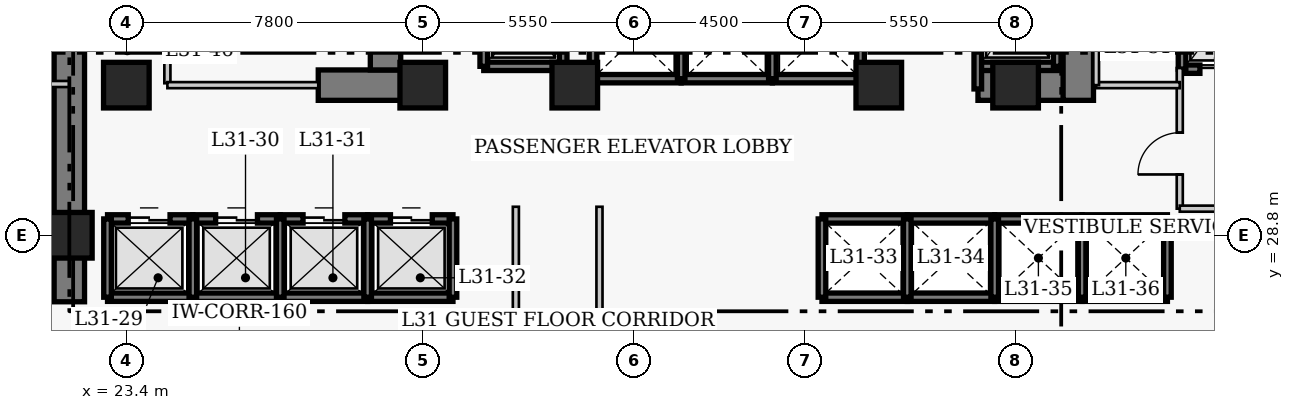
"""IFC4 building model, lengths in metres.
Left out: names, types, materials, properties, quantities, classifications, styles, units other than length and angle.
Written with IfcOpenShell. Run it as: python <this file> out.ifc"""

import sys

from ifc_helpers import new_model, si_unit, direction, frame, frame_2d, origin, origin_2d, place, context, subcontext, project, spatial, rectangle, extrude, element, fill, save


model = new_model("IFC4")
c1 = context("Model", 3, precision=1e-05, world=origin(), true_north=direction((0.0, 1.0)))
c2 = subcontext(c1, "Body", "Model", "MODEL_VIEW")
j1 = project(units=[si_unit("LENGTHUNIT", "METRE"), si_unit("PLANEANGLEUNIT", "RADIAN")], contexts=[c1])
p1 = place(None, origin())
s1 = spatial("IfcSite", under=j1, at=p1, CompositionType="ELEMENT")
p2 = place(p1, origin())
s2 = spatial("IfcBuilding", under=s1, at=p2, CompositionType="ELEMENT")
p3 = place(p2, frame((0.0, 0.0, 126.0)))
s3 = spatial("IfcBuildingStorey", under=s2, at=p3, CompositionType="ELEMENT", Elevation=126.0)
p4 = place(p3, frame((21.9, 27.05, 0.0), z_axis=(0.0, 0.0, 1.0), x_axis=(0.0, 1.0, 0.0)))
e1 = element("IfcWall", 1, at=p4, inside=s3, PredefinedType="SHEAR", context=c2, shape_type="SweptSolid", body=[
    extrude(rectangle(XDim=13.67, YDim=0.8, at=frame_2d((6.835, 0.0))), origin(), (0.0, 0.0, 1.0), 3.8),
])
p5 = place(p3, frame((28.45, 32.75, 0.0), z_axis=(0.0, 0.0, 1.0), x_axis=(1.0, 0.0, 0.0)))
e2 = element("IfcWall", 2, at=p5, inside=s3, PredefinedType="SHEAR", context=c2, shape_type="SweptSolid", body=[
    extrude(rectangle(XDim=2.4, YDim=0.8, at=frame_2d((1.2, 0.0))), origin(), (0.0, 0.0, 1.0), 3.8),
])
p6 = place(p3, frame((45.81, 32.75, 0.0), z_axis=(0.0, 0.0, 1.0), x_axis=(1.0, 0.0, 0.0)))
e3 = element("IfcWall", 3, at=p6, inside=s3, PredefinedType="SHEAR", context=c2, shape_type="SweptSolid", body=[
    extrude(rectangle(XDim=2.64, YDim=0.8, at=frame_2d((1.32, 0.0))), origin(), (0.0, 0.0, 1.0), 3.8),
])
p7 = place(p3, frame((30.22, 33.15, 0.0), z_axis=(0.0, 0.0, 1.0), x_axis=(0.0, 1.0, 0.0)))
e4 = element("IfcWall", 4, at=p7, inside=s3, PredefinedType="SHEAR", context=c2, shape_type="SweptSolid", body=[
    extrude(rectangle(XDim=7.17, YDim=0.8, at=frame_2d((3.585, 0.0))), origin(), (0.0, 0.0, 1.0), 3.8),
])
p8 = place(p3, frame((48.45, 32.35, 0.0), z_axis=(0.0, 0.0, 1.0), x_axis=(0.0, 1.0, 0.0)))
e5 = element("IfcWall", 5, at=p8, inside=s3, PredefinedType="SHEAR", context=c2, shape_type="SweptSolid", body=[
    extrude(rectangle(XDim=7.97, YDim=0.8, at=frame_2d((3.985, 0.0))), origin(), (0.0, 0.0, 1.0), 3.8),
])
p9 = place(p8, frame((5.85, 0.0, 0.0)))
e6 = element("IfcOpeningElement", 6, at=p9, cuts=e5, PredefinedType="OPENING", context=c2, shape_type="SweptSolid", body=[
    extrude(rectangle(XDim=1.1, YDim=2.15, at=frame_2d((0.55, 1.075))), frame((0.0, 0.41, 0.0), z_axis=(0.0, -1.0, 0.0), x_axis=(1.0, 0.0, 0.0)), (0.0, 0.0, 1.0), 0.82),
])
for number, where, z_axis, x_axis in (
    (7, (21.9, 28.8, 0.0), (0.0, 0.0, 1.0), (1.0, 0.0, 0.0)),
    (8, (23.4, 32.75, 0.0), (0.0, 0.0, 1.0), (1.0, 0.0, 0.0)),
    (9, (31.2, 32.75, 0.0), (0.0, 0.0, 1.0), (1.0, 0.0, 0.0)),
    (10, (35.2, 32.75, 0.0), (0.0, 0.0, 1.0), (1.0, 0.0, 0.0)),
    (11, (43.2, 32.75, 0.0), (0.0, 0.0, 1.0), (1.0, 0.0, 0.0)),
    (12, (46.8, 32.75, 0.0), (0.0, 0.0, 1.0), (1.0, 0.0, 0.0)),
):
    element("IfcColumn", number, at=place(p3, frame(where, z_axis=z_axis, x_axis=x_axis)), inside=s3, PredefinedType="COLUMN", context=c2, shape_type="SweptSolid", body=[
        extrude(rectangle(XDim=1.2, YDim=1.2, at=origin_2d()), origin(), (0.0, 0.0, 1.0), 3.8),
    ])
p10 = place(p3, frame((22.905, 29.23, 0.0), z_axis=(0.0, 0.0, 1.0), x_axis=(1.0, 0.0, 0.0)))
e13 = element("IfcWall", 13, at=p10, inside=s3, PredefinedType="SHEAR", context=c2, shape_type="SweptSolid", body=[
    extrude(rectangle(XDim=2.245, YDim=0.22, at=frame_2d((1.123, 0.0))), origin(), (0.0, 0.0, 1.0), 3.8),
])
p11 = place(p10, frame((0.545, 0.0, 0.0)))
e14 = element("IfcOpeningElement", 14, at=p11, cuts=e13, PredefinedType="OPENING", context=c2, shape_type="SweptSolid", body=[
    extrude(rectangle(XDim=1.1, YDim=2.15, at=frame_2d((0.55, 1.075))), frame((0.0, 0.12, 0.0), z_axis=(0.0, -1.0, 0.0), x_axis=(1.0, 0.0, 0.0)), (0.0, 0.0, 1.0), 0.24),
])
p12 = place(p3, frame((22.905, 27.17, 0.0), z_axis=(0.0, 0.0, 1.0), x_axis=(1.0, 0.0, 0.0)))
e15 = element("IfcWall", 15, at=p12, inside=s3, PredefinedType="SHEAR", context=c2, shape_type="SweptSolid", body=[
    extrude(rectangle(XDim=2.245, YDim=0.22, at=frame_2d((1.123, 0.0))), origin(), (0.0, 0.0, 1.0), 3.8),
])
p13 = place(p3, frame((22.905, 27.17, 0.0), z_axis=(0.0, 0.0, 1.0), x_axis=(0.0, 1.0, 0.0)))
e16 = element("IfcWall", 16, at=p13, inside=s3, PredefinedType="SHEAR", context=c2, shape_type="SweptSolid", body=[
    extrude(rectangle(XDim=2.06, YDim=0.2, at=frame_2d((1.03, 0.0))), origin(), (0.0, 0.0, 1.0), 3.8),
])
p14 = place(p3, frame((25.15, 29.23, 0.0), z_axis=(0.0, 0.0, 1.0), x_axis=(1.0, 0.0, 0.0)))
e17 = element("IfcWall", 17, at=p14, inside=s3, PredefinedType="SHEAR", context=c2, shape_type="SweptSolid", body=[
    extrude(rectangle(XDim=2.3, YDim=0.22, at=frame_2d((1.15, 0.0))), origin(), (0.0, 0.0, 1.0), 3.8),
])
p15 = place(p14, frame((0.6, 0.0, 0.0)))
e18 = element("IfcOpeningElement", 18, at=p15, cuts=e17, PredefinedType="OPENING", context=c2, shape_type="SweptSolid", body=[
    extrude(rectangle(XDim=1.1, YDim=2.15, at=frame_2d((0.55, 1.075))), frame((0.0, 0.12, 0.0), z_axis=(0.0, -1.0, 0.0), x_axis=(1.0, 0.0, 0.0)), (0.0, 0.0, 1.0), 0.24),
])
p16 = place(p3, frame((25.15, 27.17, 0.0), z_axis=(0.0, 0.0, 1.0), x_axis=(1.0, 0.0, 0.0)))
e19 = element("IfcWall", 19, at=p16, inside=s3, PredefinedType="SHEAR", context=c2, shape_type="SweptSolid", body=[
    extrude(rectangle(XDim=2.3, YDim=0.22, at=frame_2d((1.15, 0.0))), origin(), (0.0, 0.0, 1.0), 3.8),
])
p17 = place(p3, frame((25.15, 27.17, 0.0), z_axis=(0.0, 0.0, 1.0), x_axis=(0.0, 1.0, 0.0)))
e20 = element("IfcWall", 20, at=p17, inside=s3, PredefinedType="SHEAR", context=c2, shape_type="SweptSolid", body=[
    extrude(rectangle(XDim=2.06, YDim=0.2, at=frame_2d((1.03, 0.0))), origin(), (0.0, 0.0, 1.0), 3.8),
])
p18 = place(p3, frame((27.45, 29.23, 0.0), z_axis=(0.0, 0.0, 1.0), x_axis=(1.0, 0.0, 0.0)))
e21 = element("IfcWall", 21, at=p18, inside=s3, PredefinedType="SHEAR", context=c2, shape_type="SweptSolid", body=[
    extrude(rectangle(XDim=2.3, YDim=0.22, at=frame_2d((1.15, 0.0))), origin(), (0.0, 0.0, 1.0), 3.8),
])
p19 = place(p18, frame((0.6, 0.0, 0.0)))
e22 = element("IfcOpeningElement", 22, at=p19, cuts=e21, PredefinedType="OPENING", context=c2, shape_type="SweptSolid", body=[
    extrude(rectangle(XDim=1.1, YDim=2.15, at=frame_2d((0.55, 1.075))), frame((0.0, 0.12, 0.0), z_axis=(0.0, -1.0, 0.0), x_axis=(1.0, 0.0, 0.0)), (0.0, 0.0, 1.0), 0.24),
])
p20 = place(p3, frame((27.45, 27.17, 0.0), z_axis=(0.0, 0.0, 1.0), x_axis=(1.0, 0.0, 0.0)))
e23 = element("IfcWall", 23, at=p20, inside=s3, PredefinedType="SHEAR", context=c2, shape_type="SweptSolid", body=[
    extrude(rectangle(XDim=2.3, YDim=0.22, at=frame_2d((1.15, 0.0))), origin(), (0.0, 0.0, 1.0), 3.8),
])
p21 = place(p3, frame((27.45, 27.17, 0.0), z_axis=(0.0, 0.0, 1.0), x_axis=(0.0, 1.0, 0.0)))
e24 = element("IfcWall", 24, at=p21, inside=s3, PredefinedType="SHEAR", context=c2, shape_type="SweptSolid", body=[
    extrude(rectangle(XDim=2.06, YDim=0.2, at=frame_2d((1.03, 0.0))), origin(), (0.0, 0.0, 1.0), 3.8),
])
p22 = place(p3, frame((29.75, 29.23, 0.0), z_axis=(0.0, 0.0, 1.0), x_axis=(1.0, 0.0, 0.0)))
e25 = element("IfcWall", 25, at=p22, inside=s3, PredefinedType="SHEAR", context=c2, shape_type="SweptSolid", body=[
    extrude(rectangle(XDim=2.245, YDim=0.22, at=frame_2d((1.123, 0.0))), origin(), (0.0, 0.0, 1.0), 3.8),
])
p23 = place(p22, frame((0.6, 0.0, 0.0)))
e26 = element("IfcOpeningElement", 26, at=p23, cuts=e25, PredefinedType="OPENING", context=c2, shape_type="SweptSolid", body=[
    extrude(rectangle(XDim=1.1, YDim=2.15, at=frame_2d((0.55, 1.075))), frame((0.0, 0.12, 0.0), z_axis=(0.0, -1.0, 0.0), x_axis=(1.0, 0.0, 0.0)), (0.0, 0.0, 1.0), 0.24),
])
p24 = place(p3, frame((29.75, 27.17, 0.0), z_axis=(0.0, 0.0, 1.0), x_axis=(1.0, 0.0, 0.0)))
e27 = element("IfcWall", 27, at=p24, inside=s3, PredefinedType="SHEAR", context=c2, shape_type="SweptSolid", body=[
    extrude(rectangle(XDim=2.245, YDim=0.22, at=frame_2d((1.123, 0.0))), origin(), (0.0, 0.0, 1.0), 3.8),
])
for number, where, z_axis, x_axis in (
    (28, (29.75, 27.17, 0.0), (0.0, 0.0, 1.0), (0.0, 1.0, 0.0)),
    (29, (31.995, 27.17, 0.0), (0.0, 0.0, 1.0), (0.0, 1.0, 0.0)),
):
    element("IfcWall", number, at=place(p3, frame(where, z_axis=z_axis, x_axis=x_axis)), inside=s3, PredefinedType="SHEAR", context=c2, shape_type="SweptSolid", body=[
        extrude(rectangle(XDim=2.06, YDim=0.2, at=frame_2d((1.03, 0.0))), origin(), (0.0, 0.0, 1.0), 3.8),
    ])
for number, where, z_axis, x_axis in (
    (30, (41.705, 29.23, 0.0), (0.0, 0.0, 1.0), (1.0, 0.0, 0.0)),
    (31, (41.705, 27.17, 0.0), (0.0, 0.0, 1.0), (1.0, 0.0, 0.0)),
):
    element("IfcWall", number, at=place(p3, frame(where, z_axis=z_axis, x_axis=x_axis)), inside=s3, PredefinedType="SHEAR", context=c2, shape_type="SweptSolid", body=[
        extrude(rectangle(XDim=2.245, YDim=0.22, at=frame_2d((1.123, 0.0))), origin(), (0.0, 0.0, 1.0), 3.8),
    ])
p25 = place(p3, frame((41.705, 27.17, 0.0), z_axis=(0.0, 0.0, 1.0), x_axis=(0.0, 1.0, 0.0)))
e32 = element("IfcWall", 32, at=p25, inside=s3, PredefinedType="SHEAR", context=c2, shape_type="SweptSolid", body=[
    extrude(rectangle(XDim=2.06, YDim=0.2, at=frame_2d((1.03, 0.0))), origin(), (0.0, 0.0, 1.0), 3.8),
])
for number, where, z_axis, x_axis in (
    (33, (43.95, 29.23, 0.0), (0.0, 0.0, 1.0), (1.0, 0.0, 0.0)),
    (34, (43.95, 27.17, 0.0), (0.0, 0.0, 1.0), (1.0, 0.0, 0.0)),
):
    element("IfcWall", number, at=place(p3, frame(where, z_axis=z_axis, x_axis=x_axis)), inside=s3, PredefinedType="SHEAR", context=c2, shape_type="SweptSolid", body=[
        extrude(rectangle(XDim=2.3, YDim=0.22, at=frame_2d((1.15, 0.0))), origin(), (0.0, 0.0, 1.0), 3.8),
    ])
p26 = place(p3, frame((43.95, 27.17, 0.0), z_axis=(0.0, 0.0, 1.0), x_axis=(0.0, 1.0, 0.0)))
e35 = element("IfcWall", 35, at=p26, inside=s3, PredefinedType="SHEAR", context=c2, shape_type="SweptSolid", body=[
    extrude(rectangle(XDim=2.06, YDim=0.2, at=frame_2d((1.03, 0.0))), origin(), (0.0, 0.0, 1.0), 3.8),
])
for number, where, z_axis, x_axis in (
    (36, (46.25, 29.23, 0.0), (0.0, 0.0, 1.0), (1.0, 0.0, 0.0)),
    (37, (46.25, 27.17, 0.0), (0.0, 0.0, 1.0), (1.0, 0.0, 0.0)),
):
    element("IfcWall", number, at=place(p3, frame(where, z_axis=z_axis, x_axis=x_axis)), inside=s3, PredefinedType="SHEAR", context=c2, shape_type="SweptSolid", body=[
        extrude(rectangle(XDim=2.3, YDim=0.22, at=frame_2d((1.15, 0.0))), origin(), (0.0, 0.0, 1.0), 3.8),
    ])
p27 = place(p3, frame((46.25, 27.17, 0.0), z_axis=(0.0, 0.0, 1.0), x_axis=(0.0, 1.0, 0.0)))
e38 = element("IfcWall", 38, at=p27, inside=s3, PredefinedType="SHEAR", context=c2, shape_type="SweptSolid", body=[
    extrude(rectangle(XDim=2.06, YDim=0.2, at=frame_2d((1.03, 0.0))), origin(), (0.0, 0.0, 1.0), 3.8),
])
for number, where, z_axis, x_axis in (
    (39, (48.55, 29.23, 0.0), (0.0, 0.0, 1.0), (1.0, 0.0, 0.0)),
    (40, (48.55, 27.17, 0.0), (0.0, 0.0, 1.0), (1.0, 0.0, 0.0)),
):
    element("IfcWall", number, at=place(p3, frame(where, z_axis=z_axis, x_axis=x_axis)), inside=s3, PredefinedType="SHEAR", context=c2, shape_type="SweptSolid", body=[
        extrude(rectangle(XDim=2.245, YDim=0.22, at=frame_2d((1.123, 0.0))), origin(), (0.0, 0.0, 1.0), 3.8),
    ])
for number, where, z_axis, x_axis in (
    (41, (48.55, 27.17, 0.0), (0.0, 0.0, 1.0), (0.0, 1.0, 0.0)),
    (42, (50.795, 27.17, 0.0), (0.0, 0.0, 1.0), (0.0, 1.0, 0.0)),
):
    element("IfcWall", number, at=place(p3, frame(where, z_axis=z_axis, x_axis=x_axis)), inside=s3, PredefinedType="SHEAR", context=c2, shape_type="SweptSolid", body=[
        extrude(rectangle(XDim=2.06, YDim=0.2, at=frame_2d((1.03, 0.0))), origin(), (0.0, 0.0, 1.0), 3.8),
    ])
p28 = place(p3, frame((35.68, 32.92, 0.0), z_axis=(0.0, 0.0, 1.0), x_axis=(1.0, 0.0, 0.0)))
e43 = element("IfcWall", 43, at=p28, inside=s3, PredefinedType="SHEAR", context=c2, shape_type="SweptSolid", body=[
    extrude(rectangle(XDim=2.32, YDim=0.22, at=frame_2d((1.16, 0.0))), origin(), (0.0, 0.0, 1.0), 3.8),
])
p29 = place(p3, frame((35.68, 32.92, 0.0), z_axis=(0.0, 0.0, 1.0), x_axis=(0.0, 1.0, 0.0)))
e44 = element("IfcWall", 44, at=p29, inside=s3, PredefinedType="SHEAR", context=c2, shape_type="SweptSolid", body=[
    extrude(rectangle(XDim=2.16, YDim=0.2, at=frame_2d((1.08, 0.0))), origin(), (0.0, 0.0, 1.0), 3.8),
])
p30 = place(p3, frame((38.0, 32.92, 0.0), z_axis=(0.0, 0.0, 1.0), x_axis=(1.0, 0.0, 0.0)))
e45 = element("IfcWall", 45, at=p30, inside=s3, PredefinedType="SHEAR", context=c2, shape_type="SweptSolid", body=[
    extrude(rectangle(XDim=2.4, YDim=0.22, at=frame_2d((1.2, 0.0))), origin(), (0.0, 0.0, 1.0), 3.8),
])
p31 = place(p3, frame((38.0, 32.92, 0.0), z_axis=(0.0, 0.0, 1.0), x_axis=(0.0, 1.0, 0.0)))
e46 = element("IfcWall", 46, at=p31, inside=s3, PredefinedType="SHEAR", context=c2, shape_type="SweptSolid", body=[
    extrude(rectangle(XDim=2.16, YDim=0.2, at=frame_2d((1.08, 0.0))), origin(), (0.0, 0.0, 1.0), 3.8),
])
p32 = place(p3, frame((40.4, 32.92, 0.0), z_axis=(0.0, 0.0, 1.0), x_axis=(1.0, 0.0, 0.0)))
e47 = element("IfcWall", 47, at=p32, inside=s3, PredefinedType="SHEAR", context=c2, shape_type="SweptSolid", body=[
    extrude(rectangle(XDim=2.32, YDim=0.22, at=frame_2d((1.16, 0.0))), origin(), (0.0, 0.0, 1.0), 3.8),
])
for number, where, z_axis, x_axis in (
    (48, (40.4, 32.92, 0.0), (0.0, 0.0, 1.0), (0.0, 1.0, 0.0)),
    (49, (42.72, 32.92, 0.0), (0.0, 0.0, 1.0), (0.0, 1.0, 0.0)),
):
    element("IfcWall", number, at=place(p3, frame(where, z_axis=z_axis, x_axis=x_axis)), inside=s3, PredefinedType="SHEAR", context=c2, shape_type="SweptSolid", body=[
        extrude(rectangle(XDim=2.16, YDim=0.2, at=frame_2d((1.08, 0.0))), origin(), (0.0, 0.0, 1.0), 3.8),
    ])
p33 = place(p3, frame((51.18, 33.17, 0.0), z_axis=(0.0, 0.0, 1.0), x_axis=(1.0, 0.0, 0.0)))
e50 = element("IfcWall", 50, at=p33, inside=s3, PredefinedType="SHEAR", context=c2, shape_type="SweptSolid", body=[
    extrude(rectangle(XDim=2.42, YDim=0.22, at=frame_2d((1.21, 0.0))), origin(), (0.0, 0.0, 1.0), 3.8),
])
p34 = place(p33, frame((0.47, 0.0, 0.0)))
e51 = element("IfcOpeningElement", 51, at=p34, cuts=e50, PredefinedType="OPENING", context=c2, shape_type="SweptSolid", body=[
    extrude(rectangle(XDim=1.3, YDim=2.15, at=frame_2d((0.65, 1.075))), frame((0.0, 0.12, 0.0), z_axis=(0.0, -1.0, 0.0), x_axis=(1.0, 0.0, 0.0)), (0.0, 0.0, 1.0), 0.24),
])
p35 = place(p3, frame((51.18, 33.17, 0.0), z_axis=(0.0, 0.0, 1.0), x_axis=(0.0, 1.0, 0.0)))
e52 = element("IfcWall", 52, at=p35, inside=s3, PredefinedType="SHEAR", context=c2, shape_type="SweptSolid", body=[
    extrude(rectangle(XDim=2.86, YDim=0.2, at=frame_2d((1.43, 0.0))), origin(), (0.0, 0.0, 1.0), 3.8),
])
p36 = place(p3, frame((32.805, 33.245, 0.0), z_axis=(0.0, 0.0, 1.0), x_axis=(1.0, 0.0, 0.0)))
e53 = element("IfcWall", 53, at=p36, inside=s3, PredefinedType="SHEAR", context=c2, shape_type="SweptSolid", body=[
    extrude(rectangle(XDim=2.09, YDim=0.22, at=frame_2d((1.045, 0.0))), origin(), (0.0, 0.0, 1.0), 3.8),
])
for number, where, z_axis, x_axis in (
    (54, (32.805, 33.245, 0.0), (0.0, 0.0, 1.0), (0.0, 1.0, 0.0)),
    (55, (34.895, 33.245, 0.0), (0.0, 0.0, 1.0), (0.0, 1.0, 0.0)),
):
    element("IfcWall", number, at=place(p3, frame(where, z_axis=z_axis, x_axis=x_axis)), inside=s3, PredefinedType="SHEAR", context=c2, shape_type="SweptSolid", body=[
        extrude(rectangle(XDim=2.91, YDim=0.2, at=frame_2d((1.455, 0.0))), origin(), (0.0, 0.0, 1.0), 3.8),
    ])
p37 = place(p3, frame((45.805, 33.245, 0.0), z_axis=(0.0, 0.0, 1.0), x_axis=(1.0, 0.0, 0.0)))
e56 = element("IfcWall", 56, at=p37, inside=s3, PredefinedType="SHEAR", context=c2, shape_type="SweptSolid", body=[
    extrude(rectangle(XDim=2.09, YDim=0.22, at=frame_2d((1.045, 0.0))), origin(), (0.0, 0.0, 1.0), 3.8),
])
p38 = place(p3, frame((45.805, 32.65, 0.0), z_axis=(0.0, 0.0, 1.0), x_axis=(0.0, 1.0, 0.0)))
e57 = element("IfcWall", 57, at=p38, inside=s3, PredefinedType="SHEAR", context=c2, shape_type="SweptSolid", body=[
    extrude(rectangle(XDim=3.505, YDim=0.2, at=frame_2d((1.752, 0.0))), origin(), (0.0, 0.0, 1.0), 3.8),
])
p39 = place(p3, frame((47.895, 33.245, 0.0), z_axis=(0.0, 0.0, 1.0), x_axis=(0.0, 1.0, 0.0)))
e58 = element("IfcWall", 58, at=p39, inside=s3, PredefinedType="SHEAR", context=c2, shape_type="SweptSolid", body=[
    extrude(rectangle(XDim=2.91, YDim=0.2, at=frame_2d((1.455, 0.0))), origin(), (0.0, 0.0, 1.0), 3.8),
])
p40 = place(p3, frame((24.48, 32.8, 0.0), z_axis=(0.0, 0.0, 1.0), x_axis=(0.0, 1.0, 0.0)))
e59 = element("IfcWall", 59, at=p40, inside=s3, PredefinedType="PARTITIONING", context=c2, shape_type="SweptSolid", body=[
    extrude(rectangle(XDim=3.57, YDim=0.16, at=frame_2d((1.785, 0.0))), origin(), (0.0, 0.0, 1.0), 3.46),
])
p41 = place(p40, frame((1.604, 0.0, 0.0)))
e60 = element("IfcOpeningElement", 60, at=p41, cuts=e59, PredefinedType="OPENING", context=c2, shape_type="SweptSolid", body=[
    extrude(rectangle(XDim=0.9, YDim=2.1, at=frame_2d((0.45, 1.05))), frame((0.0, 0.09, 0.0), z_axis=(0.0, -1.0, 0.0), x_axis=(1.0, 0.0, 0.0)), (0.0, 0.0, 1.0), 0.18),
])
p42 = place(p3, frame((51.12, 29.5, 0.0), z_axis=(0.0, 0.0, 1.0), x_axis=(0.0, 1.0, 0.0)))
e61 = element("IfcWall", 61, at=p42, inside=s3, PredefinedType="PARTITIONING", context=c2, shape_type="SweptSolid", body=[
    extrude(rectangle(XDim=3.7, YDim=0.16, at=frame_2d((1.85, 0.0))), origin(), (0.0, 0.0, 1.0), 3.46),
])
p43 = place(p42, frame((0.9, 0.0, 0.0)))
e62 = element("IfcOpeningElement", 62, at=p43, cuts=e61, PredefinedType="OPENING", context=c2, shape_type="SweptSolid", body=[
    extrude(rectangle(XDim=1.1, YDim=2.15, at=frame_2d((0.55, 1.075))), frame((0.0, 0.09, 0.0), z_axis=(0.0, -1.0, 0.0), x_axis=(1.0, 0.0, 0.0)), (0.0, 0.0, 1.0), 0.18),
])
p44 = place(p3, frame((51.12, 29.5, 0.0), z_axis=(0.0, 0.0, 1.0), x_axis=(1.0, 0.0, 0.0)))
e63 = element("IfcWall", 63, at=p44, inside=s3, PredefinedType="PARTITIONING", context=c2, shape_type="SweptSolid", body=[
    extrude(rectangle(XDim=5.63, YDim=0.16, at=frame_2d((2.815, 0.0))), origin(), (0.0, 0.0, 1.0), 3.46),
])
p45 = place(p3, frame((24.48, 32.75, 0.0), z_axis=(0.0, 0.0, 1.0), x_axis=(1.0, 0.0, 0.0)))
e64 = element("IfcWall", 64, at=p45, inside=s3, PredefinedType="PARTITIONING", context=c2, shape_type="SweptSolid", body=[
    extrude(rectangle(XDim=3.97, YDim=0.16, at=frame_2d((1.985, 0.0))), origin(), (0.0, 0.0, 1.0), 3.46),
])
p46 = place(p3, frame((48.92, 32.75, 0.0), z_axis=(0.0, 0.0, 1.0), x_axis=(1.0, 0.0, 0.0)))
e65 = element("IfcWall", 65, at=p46, inside=s3, PredefinedType="PARTITIONING", context=c2, shape_type="SweptSolid", body=[
    extrude(rectangle(XDim=2.2, YDim=0.16, at=frame_2d((1.1, 0.0))), origin(), (0.0, 0.0, 1.0), 3.46),
])
p47 = place(p3, frame((48.92, 32.75, 0.0), z_axis=(0.0, 0.0, 1.0), x_axis=(0.0, 1.0, 0.0)))
e66 = element("IfcWall", 66, at=p47, inside=s3, PredefinedType="PARTITIONING", context=c2, shape_type="SweptSolid", body=[
    extrude(rectangle(XDim=3.62, YDim=0.15, at=frame_2d((1.81, 0.0))), origin(), (0.0, 0.0, 1.0), 3.46),
])
for number, where, z_axis, x_axis in (
    (67, (33.65, 25.91, 0.0), (0.0, 0.0, 1.0), (0.0, 1.0, 0.0)),
    (68, (35.85, 25.91, 0.0), (0.0, 0.0, 1.0), (0.0, 1.0, 0.0)),
):
    element("IfcWall", number, at=place(p3, frame(where, z_axis=z_axis, x_axis=x_axis)), inside=s3, PredefinedType="PARTITIONING", context=c2, shape_type="SweptSolid", body=[
        extrude(rectangle(XDim=3.64, YDim=0.16, at=frame_2d((1.82, 0.0))), origin(), (0.0, 0.0, 1.0), 3.46),
    ])
p48 = place(p3, frame((19.16, 32.78, 0.0), z_axis=(0.0, 0.0, 1.0), x_axis=(1.0, 0.0, 0.0)))
e69 = element("IfcWall", 69, at=p48, inside=s3, PredefinedType="PARTITIONING", context=c2, shape_type="SweptSolid", body=[
    extrude(rectangle(XDim=2.74, YDim=0.16, at=frame_2d((1.37, 0.0))), origin(), (0.0, 0.0, 1.0), 3.46),
])
p49 = place(p11, origin())
e70 = element("IfcDoor", 70, at=p49, inside=s3, OperationType="DOUBLE_DOOR_SLIDING", PredefinedType="DOOR", context=c2, shape_type="SweptSolid", body=[
    extrude(rectangle(XDim=1.1, YDim=2.15, at=frame_2d((0.55, 1.075))), frame((0.0, 0.025, 0.0), z_axis=(0.0, -1.0, 0.0), x_axis=(1.0, 0.0, 0.0)), (0.0, 0.0, 1.0), 0.05),
])
fill(e14, e70)
p50 = place(p15, origin())
e71 = element("IfcDoor", 71, at=p50, inside=s3, OperationType="DOUBLE_DOOR_SLIDING", PredefinedType="DOOR", context=c2, shape_type="SweptSolid", body=[
    extrude(rectangle(XDim=1.1, YDim=2.15, at=frame_2d((0.55, 1.075))), frame((0.0, 0.025, 0.0), z_axis=(0.0, -1.0, 0.0), x_axis=(1.0, 0.0, 0.0)), (0.0, 0.0, 1.0), 0.05),
])
fill(e18, e71)
p51 = place(p19, origin())
e72 = element("IfcDoor", 72, at=p51, inside=s3, OperationType="DOUBLE_DOOR_SLIDING", PredefinedType="DOOR", context=c2, shape_type="SweptSolid", body=[
    extrude(rectangle(XDim=1.1, YDim=2.15, at=frame_2d((0.55, 1.075))), frame((0.0, 0.025, 0.0), z_axis=(0.0, -1.0, 0.0), x_axis=(1.0, 0.0, 0.0)), (0.0, 0.0, 1.0), 0.05),
])
fill(e22, e72)
p52 = place(p23, origin())
e73 = element("IfcDoor", 73, at=p52, inside=s3, OperationType="DOUBLE_DOOR_SLIDING", PredefinedType="DOOR", context=c2, shape_type="SweptSolid", body=[
    extrude(rectangle(XDim=1.1, YDim=2.15, at=frame_2d((0.55, 1.075))), frame((0.0, 0.025, 0.0), z_axis=(0.0, -1.0, 0.0), x_axis=(1.0, 0.0, 0.0)), (0.0, 0.0, 1.0), 0.05),
])
fill(e26, e73)
p53 = place(p34, origin())
e74 = element("IfcDoor", 74, at=p53, inside=s3, OperationType="DOUBLE_DOOR_SLIDING", PredefinedType="DOOR", context=c2, shape_type="SweptSolid", body=[
    extrude(rectangle(XDim=1.3, YDim=2.15, at=frame_2d((0.65, 1.075))), frame((0.0, 0.025, 0.0), z_axis=(0.0, -1.0, 0.0), x_axis=(1.0, 0.0, 0.0)), (0.0, 0.0, 1.0), 0.05),
])
fill(e51, e74)
p54 = place(p43, origin())
e75 = element("IfcDoor", 75, at=p54, inside=s3, OperationType="SINGLE_SWING_LEFT", PredefinedType="DOOR", context=c2, shape_type="SweptSolid", body=[
    extrude(rectangle(XDim=1.1, YDim=2.15, at=frame_2d((0.55, 1.075))), frame((0.0, 0.025, 0.0), z_axis=(0.0, -1.0, 0.0), x_axis=(1.0, 0.0, 0.0)), (0.0, 0.0, 1.0), 0.05),
])
fill(e62, e75)
save(model, sys.argv[1])
